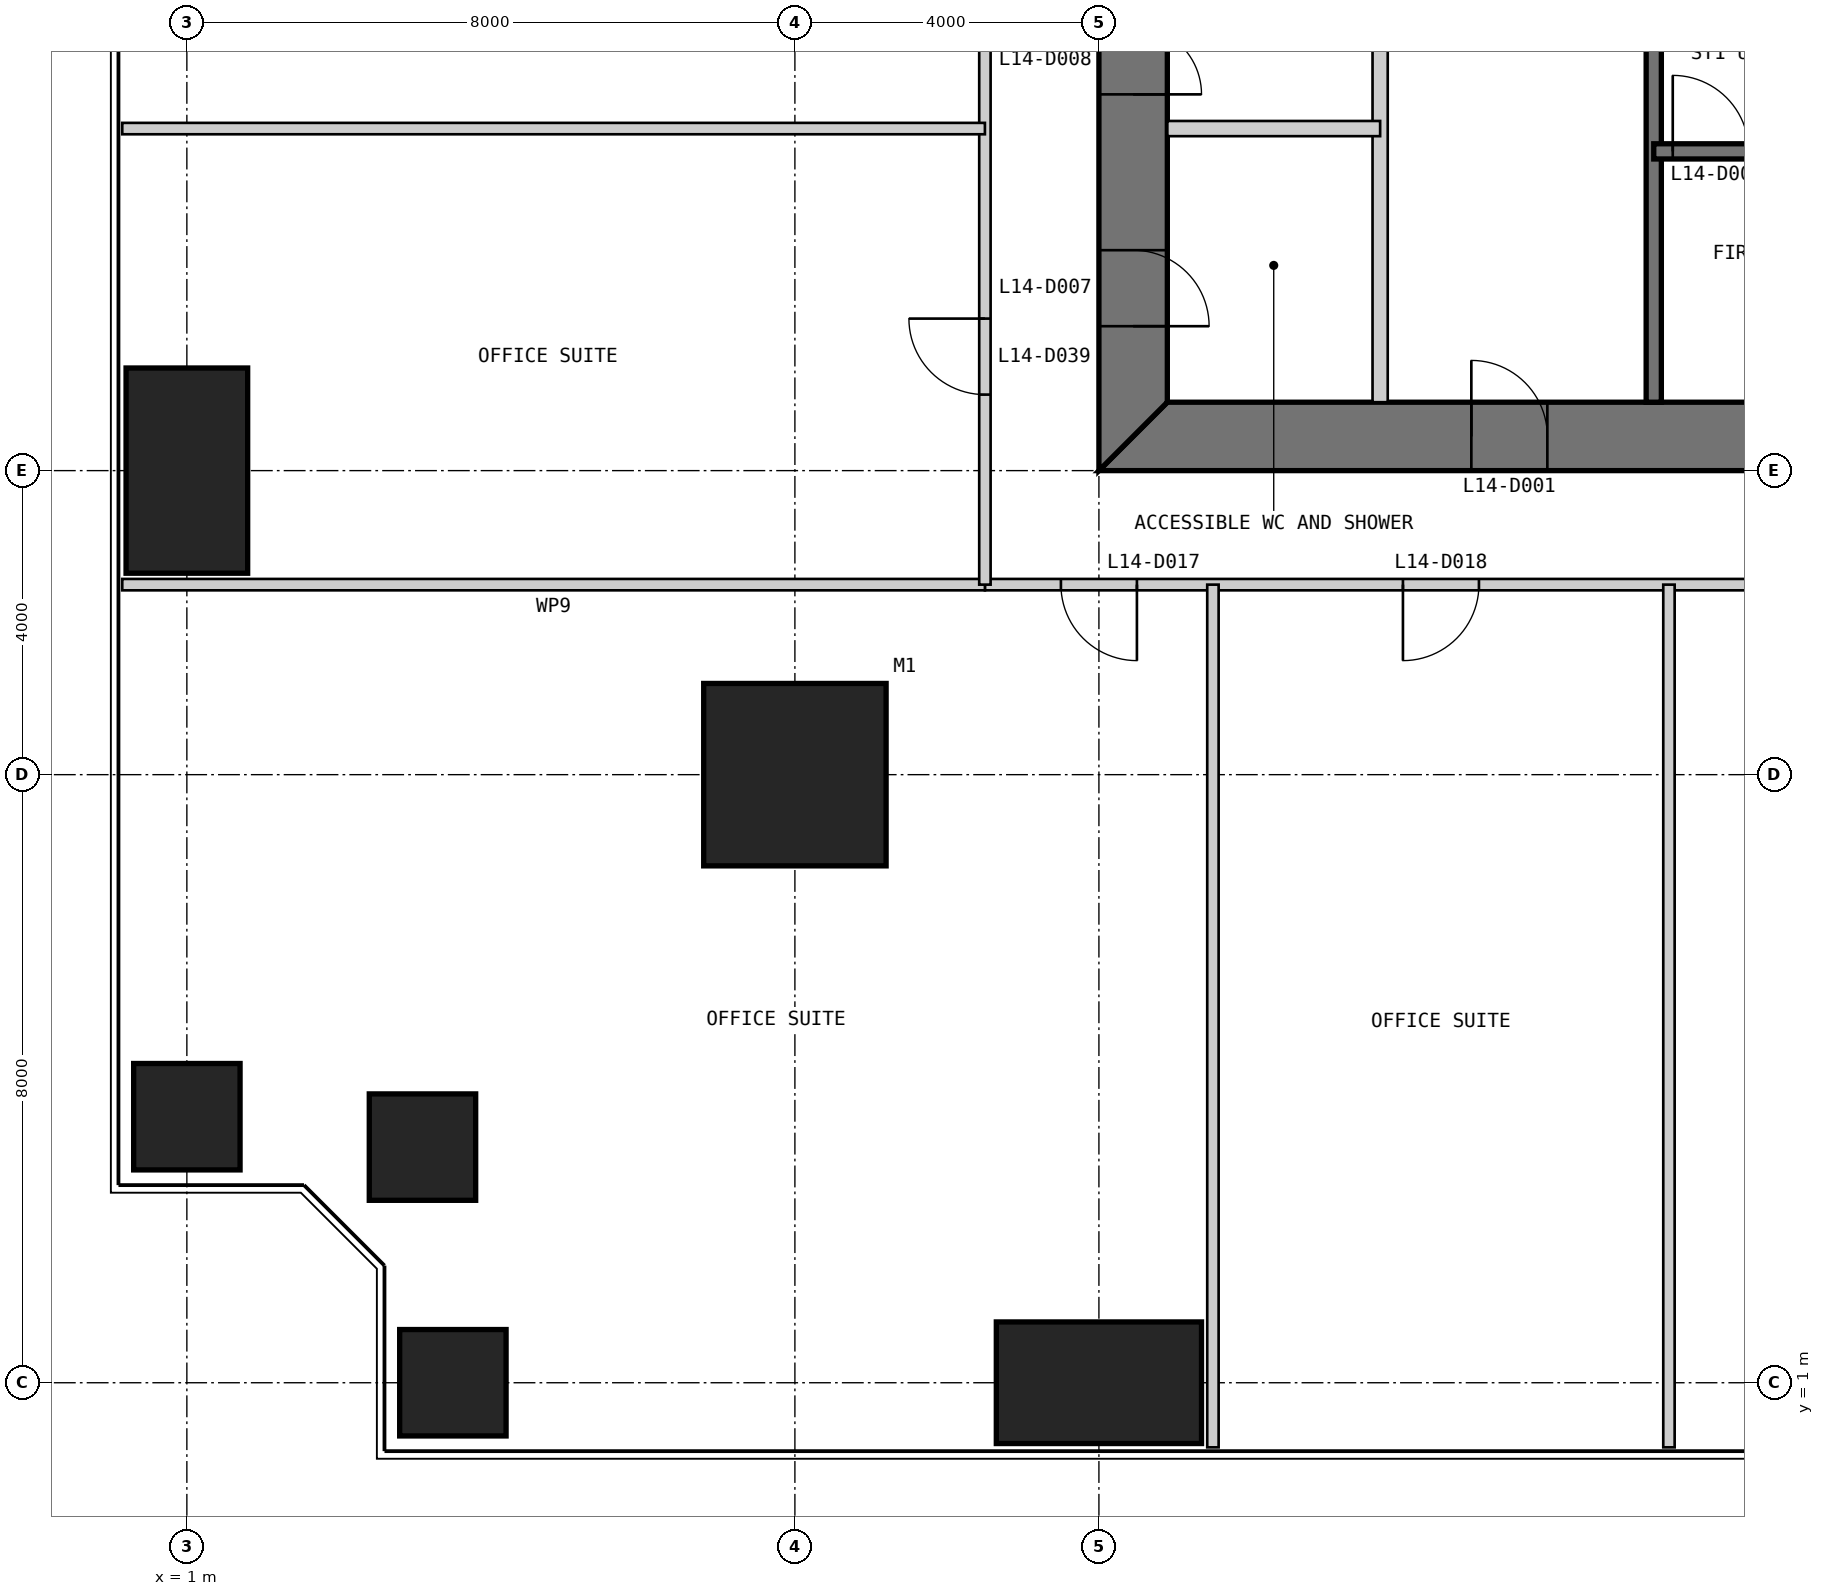
"""IFC4 building model, lengths in metres.
Left out: names, types, materials, properties, quantities, classifications, styles, units other than length and angle.
Written with IfcOpenShell. Run it as: python <this file> out.ifc"""

import sys

from ifc_helpers import new_model, si_unit, direction, frame, frame_2d, origin, origin_2d, place, context, subcontext, project, spatial, polyline, rectangle, outline, extrude, element, fill, save


model = new_model("IFC4")
c1 = context("Model", 3, precision=1e-05, world=origin(), true_north=direction((0.0, 1.0)))
c2 = subcontext(c1, "Body", "Model", "MODEL_VIEW")
j1 = project(units=[si_unit("LENGTHUNIT", "METRE"), si_unit("PLANEANGLEUNIT", "RADIAN")], contexts=[c1])
p1 = place(None, origin())
s1 = spatial("IfcSite", under=j1, at=p1, CompositionType="ELEMENT")
p2 = place(p1, origin())
s2 = spatial("IfcBuilding", under=s1, at=p2, CompositionType="ELEMENT")
p3 = place(p2, frame((0.0, 0.0, 63.0)))
s3 = spatial("IfcBuildingStorey", under=s2, at=p3, CompositionType="ELEMENT", Elevation=63.0)
p4 = place(p3, frame((9.0, 9.0, 0.0), z_axis=(0.0, 0.0, 1.0), x_axis=(1.0, 0.0, 0.0)))
e1 = element("IfcColumn", 1, at=p4, inside=s3, PredefinedType="COLUMN", context=c2, shape_type="SweptSolid", body=[
    extrude(rectangle(XDim=2.4, YDim=2.4, at=origin_2d()), origin(), (0.0, 0.0, 1.0), 4.0),
])
p5 = place(p3, frame((4.5, 1.0, 0.0), z_axis=(0.0, 0.0, 1.0), x_axis=(1.0, 0.0, 0.0)))
e2 = element("IfcColumn", 2, at=p5, inside=s3, PredefinedType="COLUMN", context=c2, shape_type="SweptSolid", body=[
    extrude(rectangle(XDim=1.4, YDim=1.4, at=origin_2d()), origin(), (0.0, 0.0, 1.0), 4.0),
])
p6 = place(p3, frame((13.0, 1.0, 0.0), z_axis=(0.0, 0.0, 1.0), x_axis=(1.0, 0.0, 0.0)))
e3 = element("IfcColumn", 3, at=p6, inside=s3, PredefinedType="COLUMN", context=c2, shape_type="SweptSolid", body=[
    extrude(rectangle(XDim=2.7, YDim=1.6, at=origin_2d()), origin(), (0.0, 0.0, 1.0), 4.0),
])
p7 = place(p3, frame((1.0, 13.0, 0.0), z_axis=(0.0, 0.0, 1.0), x_axis=(1.0, 0.0, 0.0)))
e4 = element("IfcColumn", 4, at=p7, inside=s3, PredefinedType="COLUMN", context=c2, shape_type="SweptSolid", body=[
    extrude(rectangle(XDim=1.6, YDim=2.7, at=origin_2d()), origin(), (0.0, 0.0, 1.0), 4.0),
])
for number, where, z_axis, x_axis in (
    (5, (1.0, 4.5, 0.0), (0.0, 0.0, 1.0), (1.0, 0.0, 0.0)),
    (6, (4.1, 4.1, 0.0), (0.0, 0.0, 1.0), (1.0, 0.0, 0.0)),
):
    element("IfcColumn", number, at=place(p3, frame(where, z_axis=z_axis, x_axis=x_axis)), inside=s3, PredefinedType="COLUMN", context=c2, shape_type="SweptSolid", body=[
        extrude(rectangle(XDim=1.4, YDim=1.4, at=origin_2d()), origin(), (0.0, 0.0, 1.0), 4.0),
    ])
p8 = place(p3, frame((13.0, 13.45, 0.0), z_axis=(0.0, 0.0, 1.0), x_axis=(1.0, 0.0, 0.0)))
e7 = element("IfcWall", 7, at=p8, inside=s3, PredefinedType="SHEAR", context=c2, shape_type="SweptSolid", body=[
    extrude(outline(polyline([(0.0, -0.45), (24.0, -0.45), (23.1, 0.45), (0.9, 0.45), (0.0, -0.45)])), origin(), (0.0, 0.0, 1.0), 4.0),
])
p9 = place(p8, frame((4.9, 0.0, 0.0)))
e8 = element("IfcOpeningElement", 8, at=p9, cuts=e7, PredefinedType="OPENING", context=c2, shape_type="SweptSolid", body=[
    extrude(rectangle(XDim=1.0, YDim=2.2, at=frame_2d((0.5, 1.1))), frame((0.0, 0.46, 0.0), z_axis=(0.0, -1.0, 0.0), x_axis=(1.0, 0.0, 0.0)), (0.0, 0.0, 1.0), 0.92),
])
p10 = place(p8, frame((8.9, 0.0, 0.0)))
e9 = element("IfcOpeningElement", 9, at=p10, cuts=e7, PredefinedType="OPENING", context=c2, shape_type="SweptSolid", body=[
    extrude(rectangle(XDim=1.1, YDim=2.2, at=frame_2d((0.55, 1.1))), frame((0.0, 0.46, 0.0), z_axis=(0.0, -1.0, 0.0), x_axis=(1.0, 0.0, 0.0)), (0.0, 0.0, 1.0), 0.92),
])
p11 = place(p8, frame((15.05, 0.0, 0.0)))
e10 = element("IfcOpeningElement", 10, at=p11, cuts=e7, PredefinedType="OPENING", context=c2, shape_type="SweptSolid", body=[
    extrude(rectangle(XDim=0.9, YDim=2.2, at=frame_2d((0.45, 1.1))), frame((0.0, 0.46, 0.0), z_axis=(0.0, -1.0, 0.0), x_axis=(1.0, 0.0, 0.0)), (0.0, 0.0, 1.0), 0.92),
])
p12 = place(p8, frame((17.9, 0.0, 0.0)))
e11 = element("IfcOpeningElement", 11, at=p12, cuts=e7, PredefinedType="OPENING", context=c2, shape_type="SweptSolid", body=[
    extrude(rectangle(XDim=1.0, YDim=2.2, at=frame_2d((0.5, 1.1))), frame((0.0, 0.46, 0.0), z_axis=(0.0, -1.0, 0.0), x_axis=(1.0, 0.0, 0.0)), (0.0, 0.0, 1.0), 0.92),
])
p13 = place(p8, frame((21.4, 0.0, 0.0)))
e12 = element("IfcOpeningElement", 12, at=p13, cuts=e7, PredefinedType="OPENING", context=c2, shape_type="SweptSolid", body=[
    extrude(rectangle(XDim=1.0, YDim=2.2, at=frame_2d((0.5, 1.1))), frame((0.0, 0.46, 0.0), z_axis=(0.0, -1.0, 0.0), x_axis=(1.0, 0.0, 0.0)), (0.0, 0.0, 1.0), 0.92),
])
p14 = place(p3, frame((13.45, 36.1, 0.0), z_axis=(0.0, 0.0, 1.0), x_axis=(0.0, -1.0, 0.0)))
e13 = element("IfcWall", 13, at=p14, inside=s3, PredefinedType="SHEAR", context=c2, shape_type="SweptSolid", body=[
    extrude(outline(polyline([(-0.9, -0.45), (23.1, -0.45), (22.2, 0.45), (0.0, 0.45), (-0.9, -0.45)])), origin(), (0.0, 0.0, 1.0), 4.0),
])
p15 = place(p14, frame((20.2, 0.0, 0.0)))
e14 = element("IfcOpeningElement", 14, at=p15, cuts=e13, PredefinedType="OPENING", context=c2, shape_type="SweptSolid", body=[
    extrude(rectangle(XDim=1.0, YDim=2.2, at=frame_2d((0.5, 1.1))), frame((0.0, 0.46, 0.0), z_axis=(0.0, -1.0, 0.0), x_axis=(1.0, 0.0, 0.0)), (0.0, 0.0, 1.0), 0.92),
])
p16 = place(p14, frame((17.25, 0.0, 0.0)))
e15 = element("IfcOpeningElement", 15, at=p16, cuts=e13, PredefinedType="OPENING", context=c2, shape_type="SweptSolid", body=[
    extrude(rectangle(XDim=0.9, YDim=2.2, at=frame_2d((0.45, 1.1))), frame((0.0, 0.46, 0.0), z_axis=(0.0, -1.0, 0.0), x_axis=(1.0, 0.0, 0.0)), (0.0, 0.0, 1.0), 0.92),
])
p17 = place(p3, frame((16.7, 13.9, 0.0), z_axis=(0.0, 0.0, 1.0), x_axis=(0.0, 1.0, 0.0)))
e16 = element("IfcWall", 16, at=p17, inside=s3, PredefinedType="PARTITIONING", context=c2, shape_type="SweptSolid", body=[
    extrude(rectangle(XDim=16.1, YDim=0.2, at=frame_2d((8.05, 0.0))), origin(), (0.0, 0.0, 1.0), 3.8),
])
p18 = place(p17, frame((7.217, 0.0, 0.0)))
e17 = element("IfcOpeningElement", 17, at=p18, cuts=e16, PredefinedType="OPENING", context=c2, shape_type="SweptSolid", body=[
    extrude(rectangle(XDim=1.1, YDim=2.2, at=frame_2d((0.55, 1.1))), frame((0.0, 0.11, 0.0), z_axis=(0.0, -1.0, 0.0), x_axis=(1.0, 0.0, 0.0)), (0.0, 0.0, 1.0), 0.22),
])
p19 = place(p17, frame((10.55, 0.0, 0.0)))
e18 = element("IfcOpeningElement", 18, at=p19, cuts=e16, PredefinedType="OPENING", context=c2, shape_type="SweptSolid", body=[
    extrude(rectangle(XDim=1.1, YDim=2.2, at=frame_2d((0.55, 1.1))), frame((0.0, 0.11, 0.0), z_axis=(0.0, -1.0, 0.0), x_axis=(1.0, 0.0, 0.0)), (0.0, 0.0, 1.0), 0.22),
])
p20 = place(p17, frame((13.883, 0.0, 0.0)))
e19 = element("IfcOpeningElement", 19, at=p20, cuts=e16, PredefinedType="OPENING", context=c2, shape_type="SweptSolid", body=[
    extrude(rectangle(XDim=1.1, YDim=2.2, at=frame_2d((0.55, 1.1))), frame((0.0, 0.11, 0.0), z_axis=(0.0, -1.0, 0.0), x_axis=(1.0, 0.0, 0.0)), (0.0, 0.0, 1.0), 0.22),
])
p21 = place(p3, frame((20.3, 13.9, 0.0), z_axis=(0.0, 0.0, 1.0), x_axis=(0.0, 1.0, 0.0)))
e20 = element("IfcWall", 20, at=p21, inside=s3, PredefinedType="SOLIDWALL", context=c2, shape_type="SweptSolid", body=[
    extrude(rectangle(XDim=16.1, YDim=0.2, at=frame_2d((8.05, 0.0))), origin(), (0.0, 0.0, 1.0), 3.8),
])
p22 = place(p3, frame((20.3, 17.2, 0.0), z_axis=(0.0, 0.0, 1.0), x_axis=(1.0, 0.0, 0.0)))
e21 = element("IfcWall", 21, at=p22, inside=s3, PredefinedType="SOLIDWALL", context=c2, shape_type="SweptSolid", body=[
    extrude(rectangle(XDim=9.4, YDim=0.2, at=frame_2d((4.7, 0.0))), origin(), (0.0, 0.0, 1.0), 3.8),
])
p23 = place(p22, frame((0.25, 0.0, 0.0)))
e22 = element("IfcOpeningElement", 22, at=p23, cuts=e21, PredefinedType="OPENING", context=c2, shape_type="SweptSolid", body=[
    extrude(rectangle(XDim=1.0, YDim=2.2, at=frame_2d((0.5, 1.1))), frame((0.0, 0.11, 0.0), z_axis=(0.0, -1.0, 0.0), x_axis=(1.0, 0.0, 0.0)), (0.0, 0.0, 1.0), 0.22),
])
p24 = place(p3, frame((13.9, 17.5, 0.0), z_axis=(0.0, 0.0, 1.0), x_axis=(1.0, 0.0, 0.0)))
e23 = element("IfcWall", 23, at=p24, inside=s3, PredefinedType="PARTITIONING", context=c2, shape_type="SweptSolid", body=[
    extrude(rectangle(XDim=2.8, YDim=0.2, at=frame_2d((1.4, 0.0))), origin(), (0.0, 0.0, 1.0), 3.8),
])
p25 = place(p3, frame((11.5, 11.5, 0.0), z_axis=(0.0, 0.0, 1.0), x_axis=(1.0, 0.0, 0.0)))
e24 = element("IfcWall", 24, at=p25, inside=s3, PredefinedType="PARTITIONING", context=c2, shape_type="SweptSolid", body=[
    extrude(rectangle(XDim=27.0, YDim=0.15, at=frame_2d((13.5, 0.0))), origin(), (0.0, 0.0, 1.0), 3.85),
])
p26 = place(p25, frame((1.0, 0.0, 0.0)))
e25 = element("IfcOpeningElement", 25, at=p26, cuts=e24, PredefinedType="OPENING", context=c2, shape_type="SweptSolid", body=[
    extrude(rectangle(XDim=1.0, YDim=2.2, at=frame_2d((0.5, 1.1))), frame((0.0, 0.085, 0.0), z_axis=(0.0, -1.0, 0.0), x_axis=(1.0, 0.0, 0.0)), (0.0, 0.0, 1.0), 0.17),
])
p27 = place(p25, frame((5.5, 0.0, 0.0)))
e26 = element("IfcOpeningElement", 26, at=p27, cuts=e24, PredefinedType="OPENING", context=c2, shape_type="SweptSolid", body=[
    extrude(rectangle(XDim=1.0, YDim=2.2, at=frame_2d((0.5, 1.1))), frame((0.0, 0.085, 0.0), z_axis=(0.0, -1.0, 0.0), x_axis=(1.0, 0.0, 0.0)), (0.0, 0.0, 1.0), 0.17),
])
p28 = place(p25, frame((11.5, 0.0, 0.0)))
e27 = element("IfcOpeningElement", 27, at=p28, cuts=e24, PredefinedType="OPENING", context=c2, shape_type="SweptSolid", body=[
    extrude(rectangle(XDim=1.0, YDim=2.2, at=frame_2d((0.5, 1.1))), frame((0.0, 0.085, 0.0), z_axis=(0.0, -1.0, 0.0), x_axis=(1.0, 0.0, 0.0)), (0.0, 0.0, 1.0), 0.17),
])
p29 = place(p25, frame((19.0, 0.0, 0.0)))
e28 = element("IfcOpeningElement", 28, at=p29, cuts=e24, PredefinedType="OPENING", context=c2, shape_type="SweptSolid", body=[
    extrude(rectangle(XDim=1.0, YDim=2.2, at=frame_2d((0.5, 1.1))), frame((0.0, 0.085, 0.0), z_axis=(0.0, -1.0, 0.0), x_axis=(1.0, 0.0, 0.0)), (0.0, 0.0, 1.0), 0.17),
])
for number, where, z_axis, x_axis in (
    (29, (0.15, 11.5, 0.0), (0.0, 0.0, 1.0), (1.0, 0.0, 0.0)),
    (30, (14.5, 0.15, 0.0), (0.0, 0.0, 1.0), (0.0, 1.0, 0.0)),
    (31, (20.5, 0.15, 0.0), (0.0, 0.0, 1.0), (0.0, 1.0, 0.0)),
):
    element("IfcWall", number, at=place(p3, frame(where, z_axis=z_axis, x_axis=x_axis)), inside=s3, PredefinedType="PARTITIONING", context=c2, shape_type="SweptSolid", body=[
        extrude(rectangle(XDim=11.35, YDim=0.15, at=frame_2d((5.675, 0.0))), origin(), (0.0, 0.0, 1.0), 3.85),
    ])
p30 = place(p3, frame((11.5, 38.5, 0.0), z_axis=(0.0, 0.0, 1.0), x_axis=(0.0, -1.0, 0.0)))
e32 = element("IfcWall", 32, at=p30, inside=s3, PredefinedType="PARTITIONING", context=c2, shape_type="SweptSolid", body=[
    extrude(rectangle(XDim=27.0, YDim=0.15, at=frame_2d((13.5, 0.0))), origin(), (0.0, 0.0, 1.0), 3.85),
])
p31 = place(p30, frame((4.0, 0.0, 0.0)))
e33 = element("IfcOpeningElement", 33, at=p31, cuts=e32, PredefinedType="OPENING", context=c2, shape_type="SweptSolid", body=[
    extrude(rectangle(XDim=1.0, YDim=2.2, at=frame_2d((0.5, 1.1))), frame((0.0, 0.085, 0.0), z_axis=(0.0, -1.0, 0.0), x_axis=(1.0, 0.0, 0.0)), (0.0, 0.0, 1.0), 0.17),
])
p32 = place(p30, frame((10.0, 0.0, 0.0)))
e34 = element("IfcOpeningElement", 34, at=p32, cuts=e32, PredefinedType="OPENING", context=c2, shape_type="SweptSolid", body=[
    extrude(rectangle(XDim=1.0, YDim=2.2, at=frame_2d((0.5, 1.1))), frame((0.0, 0.085, 0.0), z_axis=(0.0, -1.0, 0.0), x_axis=(1.0, 0.0, 0.0)), (0.0, 0.0, 1.0), 0.17),
])
p33 = place(p30, frame((17.5, 0.0, 0.0)))
e35 = element("IfcOpeningElement", 35, at=p33, cuts=e32, PredefinedType="OPENING", context=c2, shape_type="SweptSolid", body=[
    extrude(rectangle(XDim=1.0, YDim=2.2, at=frame_2d((0.5, 1.1))), frame((0.0, 0.085, 0.0), z_axis=(0.0, -1.0, 0.0), x_axis=(1.0, 0.0, 0.0)), (0.0, 0.0, 1.0), 0.17),
])
p34 = place(p30, frame((23.5, 0.0, 0.0)))
e36 = element("IfcOpeningElement", 36, at=p34, cuts=e32, PredefinedType="OPENING", context=c2, shape_type="SweptSolid", body=[
    extrude(rectangle(XDim=1.0, YDim=2.2, at=frame_2d((0.5, 1.1))), frame((0.0, 0.085, 0.0), z_axis=(0.0, -1.0, 0.0), x_axis=(1.0, 0.0, 0.0)), (0.0, 0.0, 1.0), 0.17),
])
p35 = place(p3, frame((0.15, 17.5, 0.0), z_axis=(0.0, 0.0, 1.0), x_axis=(1.0, 0.0, 0.0)))
e37 = element("IfcWall", 37, at=p35, inside=s3, PredefinedType="PARTITIONING", context=c2, shape_type="SweptSolid", body=[
    extrude(rectangle(XDim=11.35, YDim=0.15, at=frame_2d((5.675, 0.0))), origin(), (0.0, 0.0, 1.0), 3.85),
])
p36 = place(p9, origin())
e38 = element("IfcDoor", 38, at=p36, inside=s3, OperationType="SINGLE_SWING_LEFT", PredefinedType="DOOR", context=c2, shape_type="SweptSolid", body=[
    extrude(rectangle(XDim=1.0, YDim=2.2, at=frame_2d((0.5, 1.1))), frame((0.0, 0.025, 0.0), z_axis=(0.0, -1.0, 0.0), x_axis=(1.0, 0.0, 0.0)), (0.0, 0.0, 1.0), 0.05),
    extrude(outline(polyline([(0.0, 0.0), (0.04, 0.0), (0.04, 2.16), (0.96, 2.16), (0.96, 0.0), (1.0, 0.0), (1.0, 2.2), (0.0, 2.2), (0.0, 0.0)])), frame((0.0, 0.3, 0.0), z_axis=(0.0, -1.0, 0.0), x_axis=(1.0, 0.0, 0.0)), (0.0, 0.0, 1.0), 0.6),
])
fill(e8, e38)
p37 = place(p23, origin())
e39 = element("IfcDoor", 39, at=p37, inside=s3, OperationType="SINGLE_SWING_LEFT", PredefinedType="DOOR", context=c2, shape_type="SweptSolid", body=[
    extrude(rectangle(XDim=1.0, YDim=2.2, at=frame_2d((0.5, 1.1))), frame((0.0, 0.025, 0.0), z_axis=(0.0, -1.0, 0.0), x_axis=(1.0, 0.0, 0.0)), (0.0, 0.0, 1.0), 0.05),
])
fill(e22, e39)
p38 = place(p15, origin())
e40 = element("IfcDoor", 40, at=p38, inside=s3, OperationType="SINGLE_SWING_RIGHT", PredefinedType="DOOR", context=c2, shape_type="SweptSolid", body=[
    extrude(rectangle(XDim=1.0, YDim=2.2, at=frame_2d((0.5, 1.1))), frame((0.0, 0.025, 0.0), z_axis=(0.0, -1.0, 0.0), x_axis=(1.0, 0.0, 0.0)), (0.0, 0.0, 1.0), 0.05),
    extrude(outline(polyline([(0.0, 0.0), (0.04, 0.0), (0.04, 2.16), (0.96, 2.16), (0.96, 0.0), (1.0, 0.0), (1.0, 2.2), (0.0, 2.2), (0.0, 0.0)])), frame((0.0, 0.3, 0.0), z_axis=(0.0, -1.0, 0.0), x_axis=(1.0, 0.0, 0.0)), (0.0, 0.0, 1.0), 0.6),
])
fill(e14, e40)
p39 = place(p16, origin())
e41 = element("IfcDoor", 41, at=p39, inside=s3, OperationType="SINGLE_SWING_RIGHT", PredefinedType="DOOR", context=c2, shape_type="SweptSolid", body=[
    extrude(rectangle(XDim=0.9, YDim=2.2, at=frame_2d((0.45, 1.1))), frame((0.0, 0.025, 0.0), z_axis=(0.0, -1.0, 0.0), x_axis=(1.0, 0.0, 0.0)), (0.0, 0.0, 1.0), 0.05),
    extrude(outline(polyline([(0.0, 0.0), (0.04, 0.0), (0.04, 2.16), (0.86, 2.16), (0.86, 0.0), (0.9, 0.0), (0.9, 2.2), (0.0, 2.2), (0.0, 0.0)])), frame((0.0, 0.3, 0.0), z_axis=(0.0, -1.0, 0.0), x_axis=(1.0, 0.0, 0.0)), (0.0, 0.0, 1.0), 0.6),
])
fill(e15, e41)
p40 = place(p26, frame((1.0, 0.0, 0.0), z_axis=(0.0, 0.0, 1.0), x_axis=(-1.0, 0.0, 0.0)))
e42 = element("IfcDoor", 42, at=p40, inside=s3, OperationType="SINGLE_SWING_LEFT", PredefinedType="DOOR", context=c2, shape_type="SweptSolid", body=[
    extrude(rectangle(XDim=1.0, YDim=2.2, at=frame_2d((0.5, 1.1))), frame((0.0, 0.025, 0.0), z_axis=(0.0, -1.0, 0.0), x_axis=(1.0, 0.0, 0.0)), (0.0, 0.0, 1.0), 0.05),
])
fill(e25, e42)
p41 = place(p27, frame((1.0, 0.0, 0.0), z_axis=(0.0, 0.0, 1.0), x_axis=(-1.0, 0.0, 0.0)))
e43 = element("IfcDoor", 43, at=p41, inside=s3, OperationType="SINGLE_SWING_RIGHT", PredefinedType="DOOR", context=c2, shape_type="SweptSolid", body=[
    extrude(rectangle(XDim=1.0, YDim=2.2, at=frame_2d((0.5, 1.1))), frame((0.0, 0.025, 0.0), z_axis=(0.0, -1.0, 0.0), x_axis=(1.0, 0.0, 0.0)), (0.0, 0.0, 1.0), 0.05),
])
fill(e26, e43)
p42 = place(p34, frame((1.0, 0.0, 0.0), z_axis=(0.0, 0.0, 1.0), x_axis=(-1.0, 0.0, 0.0)))
e44 = element("IfcDoor", 44, at=p42, inside=s3, OperationType="SINGLE_SWING_RIGHT", PredefinedType="DOOR", context=c2, shape_type="SweptSolid", body=[
    extrude(rectangle(XDim=1.0, YDim=2.2, at=frame_2d((0.5, 1.1))), frame((0.0, 0.025, 0.0), z_axis=(0.0, -1.0, 0.0), x_axis=(1.0, 0.0, 0.0)), (0.0, 0.0, 1.0), 0.05),
])
fill(e36, e44)
save(model, sys.argv[1])
